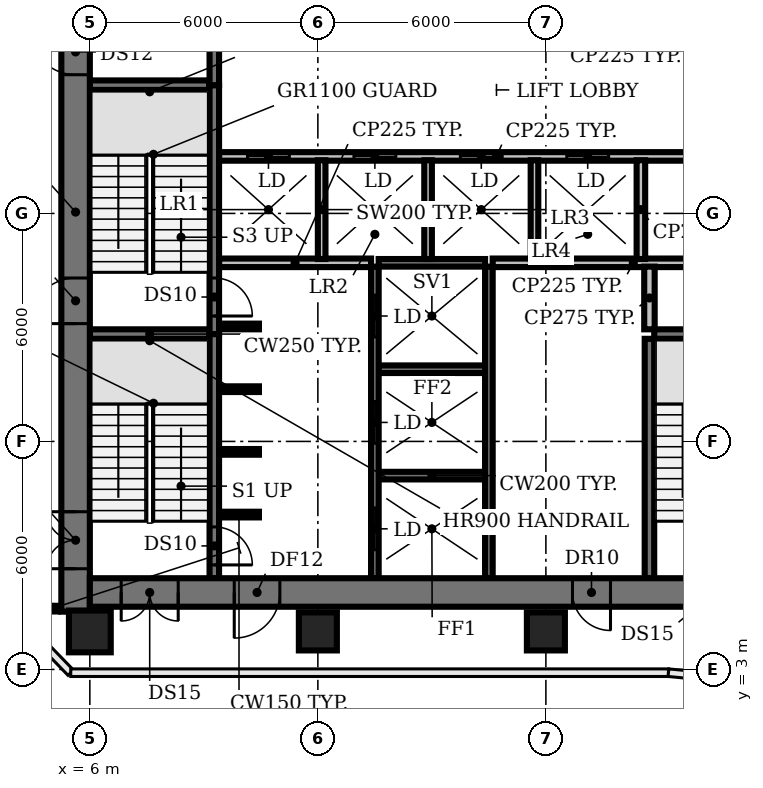
"""IFC4 building model, lengths in metres.
Left out: names, types, materials, properties, quantities, classifications, styles, units other than length and angle.
Written with IfcOpenShell. Run it as: python <this file> out.ifc"""

import sys

from ifc_helpers import new_model, si_unit, direction, frame, frame_2d, origin, origin_2d, place, context, subcontext, project, spatial, rectangle, circle, extrude, element, fill, save


model = new_model("IFC4")
c1 = context("Model", 3, precision=1e-05, world=origin(), true_north=direction((0.0, 1.0)))
c2 = subcontext(c1, "Body", "Model", "MODEL_VIEW")
j1 = project(units=[si_unit("LENGTHUNIT", "METRE"), si_unit("PLANEANGLEUNIT", "RADIAN")], contexts=[c1])
p1 = place(None, origin())
s1 = spatial("IfcSite", under=j1, at=p1, CompositionType="ELEMENT")
p2 = place(p1, origin())
s2 = spatial("IfcBuilding", under=s1, at=p2, CompositionType="ELEMENT")
p3 = place(p2, frame((0.0, 0.0, 134.0)))
s3 = spatial("IfcBuildingStorey", under=s2, at=p3, CompositionType="ELEMENT", Elevation=134.0)
p4 = place(p3, frame((6.0, 4.0, 0.0), z_axis=(0.0, 0.0, 1.0), x_axis=(1.0, 0.0, 0.0)))
e1 = element("IfcColumn", 1, at=p4, inside=s3, PredefinedType="COLUMN", context=c2, shape_type="SweptSolid", body=[
    extrude(circle(Radius=0.55, at=origin_2d()), origin(), (0.0, 0.0, 1.0), 3.2),
])
for number, where, z_axis, x_axis in (
    (2, (12.0, 4.0, 0.0), (0.0, 0.0, 1.0), (1.0, 0.0, 0.0)),
    (3, (18.0, 4.0, 0.0), (0.0, 0.0, 1.0), (1.0, 0.0, 0.0)),
):
    element("IfcColumn", number, at=place(p3, frame(where, z_axis=z_axis, x_axis=x_axis)), inside=s3, PredefinedType="COLUMN", context=c2, shape_type="SweptSolid", body=[
        extrude(rectangle(XDim=1.0, YDim=1.0, at=origin_2d()), origin(), (0.0, 0.0, 1.0), 3.2),
    ])
p5 = place(p3, frame((9.4, 7.075, 0.0), z_axis=(0.0, 0.0, 1.0), x_axis=(1.0, 0.0, 0.0)))
e4 = element("IfcWall", 4, at=p5, inside=s3, PredefinedType="SHEAR", context=c2, shape_type="SweptSolid", body=[
    extrude(rectangle(XDim=1.05, YDim=0.15, at=frame_2d((0.525, 0.0))), origin(), (0.0, 0.0, 1.0), 3.8),
])
p6 = place(p3, frame((13.6, 8.1, 0.0), z_axis=(0.0, 0.0, 1.0), x_axis=(1.0, 0.0, 0.0)))
e5 = element("IfcWall", 5, at=p6, inside=s3, PredefinedType="SHEAR", context=c2, shape_type="SweptSolid", body=[
    extrude(rectangle(XDim=2.8, YDim=0.2, at=frame_2d((1.4, 0.0))), origin(), (0.0, 0.0, 1.0), 3.8),
])
for number, where, z_axis, x_axis in (
    (6, (9.4, 8.725, 0.0), (0.0, 0.0, 1.0), (1.0, 0.0, 0.0)),
    (7, (9.4, 10.375, 0.0), (0.0, 0.0, 1.0), (1.0, 0.0, 0.0)),
):
    element("IfcWall", number, at=place(p3, frame(where, z_axis=z_axis, x_axis=x_axis)), inside=s3, PredefinedType="SHEAR", context=c2, shape_type="SweptSolid", body=[
        extrude(rectangle(XDim=1.05, YDim=0.15, at=frame_2d((0.525, 0.0))), origin(), (0.0, 0.0, 1.0), 3.8),
    ])
p7 = place(p3, frame((13.6, 10.9, 0.0), z_axis=(0.0, 0.0, 1.0), x_axis=(1.0, 0.0, 0.0)))
e8 = element("IfcWall", 8, at=p7, inside=s3, PredefinedType="SHEAR", context=c2, shape_type="SweptSolid", body=[
    extrude(rectangle(XDim=2.8, YDim=0.2, at=frame_2d((1.4, 0.0))), origin(), (0.0, 0.0, 1.0), 3.8),
])
for number, where, z_axis, x_axis in (
    (9, (6.0, 11.825, 0.0), (0.0, 0.0, 1.0), (1.0, 0.0, 0.0)),
    (10, (20.85, 11.825, 0.0), (0.0, 0.0, 1.0), (1.0, 0.0, 0.0)),
):
    element("IfcWall", number, at=place(p3, frame(where, z_axis=z_axis, x_axis=x_axis)), inside=s3, PredefinedType="SHEAR", context=c2, shape_type="SweptSolid", body=[
        extrude(rectangle(XDim=3.15, YDim=0.25, at=frame_2d((1.575, 0.0))), origin(), (0.0, 0.0, 1.0), 3.8),
    ])
p8 = place(p3, frame((9.4, 12.025, 0.0), z_axis=(0.0, 0.0, 1.0), x_axis=(1.0, 0.0, 0.0)))
e11 = element("IfcWall", 11, at=p8, inside=s3, PredefinedType="SHEAR", context=c2, shape_type="SweptSolid", body=[
    extrude(rectangle(XDim=1.05, YDim=0.15, at=frame_2d((0.525, 0.0))), origin(), (0.0, 0.0, 1.0), 3.8),
])
p9 = place(p3, frame((9.4, 13.7, 0.0), z_axis=(0.0, 0.0, 1.0), x_axis=(1.0, 0.0, 0.0)))
e12 = element("IfcWall", 12, at=p9, inside=s3, PredefinedType="PARTITIONING", context=c2, shape_type="SweptSolid", body=[
    extrude(rectangle(XDim=4.0, YDim=0.225, at=frame_2d((2.0, 0.0))), origin(), (0.0, 0.0, 1.0), 3.8),
])
p10 = place(p3, frame((13.6, 13.7, 0.0), z_axis=(0.0, 0.0, 1.0), x_axis=(1.0, 0.0, 0.0)))
e13 = element("IfcWall", 13, at=p10, inside=s3, PredefinedType="SHEAR", context=c2, shape_type="SweptSolid", body=[
    extrude(rectangle(XDim=2.8, YDim=0.2, at=frame_2d((1.4, 0.0))), origin(), (0.0, 0.0, 1.0), 3.8),
])
p11 = place(p3, frame((16.6, 13.7, 0.0), z_axis=(0.0, 0.0, 1.0), x_axis=(1.0, 0.0, 0.0)))
e14 = element("IfcWall", 14, at=p11, inside=s3, PredefinedType="PARTITIONING", context=c2, shape_type="SweptSolid", body=[
    extrude(rectangle(XDim=7.4, YDim=0.225, at=frame_2d((3.7, 0.0))), origin(), (0.0, 0.0, 1.0), 3.8),
])
p12 = place(p3, frame((9.4, 16.5, 0.0), z_axis=(0.0, 0.0, 1.0), x_axis=(1.0, 0.0, 0.0)))
e15 = element("IfcWall", 15, at=p12, inside=s3, PredefinedType="PARTITIONING", context=c2, shape_type="SweptSolid", body=[
    extrude(rectangle(XDim=14.6, YDim=0.225, at=frame_2d((7.3, 0.0))), origin(), (0.0, 0.0, 1.0), 3.8),
])
p13 = place(p12, frame((0.75, 0.0, 0.0)))
e16 = element("IfcOpeningElement", 16, at=p13, cuts=e15, PredefinedType="OPENING", context=c2, shape_type="SweptSolid", body=[
    extrude(rectangle(XDim=1.1, YDim=2.1, at=frame_2d((0.55, 1.05))), frame((0.0, 0.123, 0.0), z_axis=(0.0, -1.0, 0.0), x_axis=(1.0, 0.0, 0.0)), (0.0, 0.0, 1.0), 0.245),
])
p14 = place(p12, frame((3.55, 0.0, 0.0)))
e17 = element("IfcOpeningElement", 17, at=p14, cuts=e15, PredefinedType="OPENING", context=c2, shape_type="SweptSolid", body=[
    extrude(rectangle(XDim=1.1, YDim=2.1, at=frame_2d((0.55, 1.05))), frame((0.0, 0.123, 0.0), z_axis=(0.0, -1.0, 0.0), x_axis=(1.0, 0.0, 0.0)), (0.0, 0.0, 1.0), 0.245),
])
p15 = place(p12, frame((6.35, 0.0, 0.0)))
e18 = element("IfcOpeningElement", 18, at=p15, cuts=e15, PredefinedType="OPENING", context=c2, shape_type="SweptSolid", body=[
    extrude(rectangle(XDim=1.1, YDim=2.1, at=frame_2d((0.55, 1.05))), frame((0.0, 0.123, 0.0), z_axis=(0.0, -1.0, 0.0), x_axis=(1.0, 0.0, 0.0)), (0.0, 0.0, 1.0), 0.245),
])
p16 = place(p12, frame((9.15, 0.0, 0.0)))
e19 = element("IfcOpeningElement", 19, at=p16, cuts=e15, PredefinedType="OPENING", context=c2, shape_type="SweptSolid", body=[
    extrude(rectangle(XDim=1.1, YDim=2.1, at=frame_2d((0.55, 1.05))), frame((0.0, 0.123, 0.0), z_axis=(0.0, -1.0, 0.0), x_axis=(1.0, 0.0, 0.0)), (0.0, 0.0, 1.0), 0.245),
])
p17 = place(p12, frame((12.4, 0.0, 0.0)))
e20 = element("IfcOpeningElement", 20, at=p17, cuts=e15, PredefinedType="OPENING", context=c2, shape_type="SweptSolid", body=[
    extrude(rectangle(XDim=1.0, YDim=2.1, at=frame_2d((0.5, 1.05))), frame((0.0, 0.123, 0.0), z_axis=(0.0, -1.0, 0.0), x_axis=(1.0, 0.0, 0.0)), (0.0, 0.0, 1.0), 0.245),
])
p18 = place(p3, frame((6.0, 18.375, 0.0), z_axis=(0.0, 0.0, 1.0), x_axis=(1.0, 0.0, 0.0)))
e21 = element("IfcWall", 21, at=p18, inside=s3, PredefinedType="SHEAR", context=c2, shape_type="SweptSolid", body=[
    extrude(rectangle(XDim=3.15, YDim=0.25, at=frame_2d((1.575, 0.0))), origin(), (0.0, 0.0, 1.0), 3.8),
])
p19 = place(p3, frame((9.275, 11.825, 0.0), z_axis=(0.0, 0.0, 1.0), x_axis=(0.0, -1.0, 0.0)))
e22 = element("IfcWall", 22, at=p19, inside=s3, PredefinedType="SHEAR", context=c2, shape_type="SweptSolid", body=[
    extrude(rectangle(XDim=6.425, YDim=0.25, at=frame_2d((3.212, 0.0))), origin(), (0.0, 0.0, 1.0), 3.8),
])
p20 = place(p19, frame((5.075, 0.0, 0.0)))
e23 = element("IfcOpeningElement", 23, at=p20, cuts=e22, PredefinedType="OPENING", context=c2, shape_type="SweptSolid", body=[
    extrude(rectangle(XDim=1.0, YDim=2.1, at=frame_2d((0.5, 1.05))), frame((0.0, 0.135, 0.0), z_axis=(0.0, -1.0, 0.0), x_axis=(1.0, 0.0, 0.0)), (0.0, 0.0, 1.0), 0.27),
])
p21 = place(p3, frame((9.275, 18.375, 0.0), z_axis=(0.0, 0.0, 1.0), x_axis=(0.0, -1.0, 0.0)))
e24 = element("IfcWall", 24, at=p21, inside=s3, PredefinedType="SHEAR", context=c2, shape_type="SweptSolid", body=[
    extrude(rectangle(XDim=6.55, YDim=0.25, at=frame_2d((3.275, 0.0))), origin(), (0.0, 0.0, 1.0), 3.8),
])
p22 = place(p21, frame((5.075, 0.0, 0.0)))
e25 = element("IfcOpeningElement", 25, at=p22, cuts=e24, PredefinedType="OPENING", context=c2, shape_type="SweptSolid", body=[
    extrude(rectangle(XDim=1.0, YDim=2.1, at=frame_2d((0.5, 1.05))), frame((0.0, 0.135, 0.0), z_axis=(0.0, -1.0, 0.0), x_axis=(1.0, 0.0, 0.0)), (0.0, 0.0, 1.0), 0.27),
])
p23 = place(p3, frame((9.275, 18.375, 0.0), z_axis=(0.0, 0.0, 1.0), x_axis=(0.0, 1.0, 0.0)))
e26 = element("IfcWall", 26, at=p23, inside=s3, PredefinedType="SHEAR", context=c2, shape_type="SweptSolid", body=[
    extrude(rectangle(XDim=6.425, YDim=0.25, at=frame_2d((3.212, 0.0))), origin(), (0.0, 0.0, 1.0), 3.8),
])
p24 = place(p3, frame((12.1, 13.8, 0.0), z_axis=(0.0, 0.0, 1.0), x_axis=(0.0, 1.0, 0.0)))
e27 = element("IfcWall", 27, at=p24, inside=s3, PredefinedType="SOLIDWALL", context=c2, shape_type="SweptSolid", body=[
    extrude(rectangle(XDim=2.6, YDim=0.2, at=frame_2d((1.3, 0.0))), origin(), (0.0, 0.0, 1.0), 3.8),
])
p25 = place(p3, frame((13.5, 5.4, 0.0), z_axis=(0.0, 0.0, 1.0), x_axis=(0.0, 1.0, 0.0)))
e28 = element("IfcWall", 28, at=p25, inside=s3, PredefinedType="SHEAR", context=c2, shape_type="SweptSolid", body=[
    extrude(rectangle(XDim=8.2, YDim=0.2, at=frame_2d((4.1, 0.0))), origin(), (0.0, 0.0, 1.0), 3.8),
])
p26 = place(p25, frame((0.75, 0.0, 0.0)))
e29 = element("IfcOpeningElement", 29, at=p26, cuts=e28, PredefinedType="OPENING", context=c2, shape_type="SweptSolid", body=[
    extrude(rectangle(XDim=1.1, YDim=2.1, at=frame_2d((0.55, 1.05))), frame((0.0, 0.11, 0.0), z_axis=(0.0, -1.0, 0.0), x_axis=(1.0, 0.0, 0.0)), (0.0, 0.0, 1.0), 0.22),
])
p27 = place(p25, frame((3.55, 0.0, 0.0)))
e30 = element("IfcOpeningElement", 30, at=p27, cuts=e28, PredefinedType="OPENING", context=c2, shape_type="SweptSolid", body=[
    extrude(rectangle(XDim=1.1, YDim=2.1, at=frame_2d((0.55, 1.05))), frame((0.0, 0.11, 0.0), z_axis=(0.0, -1.0, 0.0), x_axis=(1.0, 0.0, 0.0)), (0.0, 0.0, 1.0), 0.22),
])
p28 = place(p25, frame((6.35, 0.0, 0.0)))
e31 = element("IfcOpeningElement", 31, at=p28, cuts=e28, PredefinedType="OPENING", context=c2, shape_type="SweptSolid", body=[
    extrude(rectangle(XDim=1.1, YDim=2.1, at=frame_2d((0.55, 1.05))), frame((0.0, 0.11, 0.0), z_axis=(0.0, -1.0, 0.0), x_axis=(1.0, 0.0, 0.0)), (0.0, 0.0, 1.0), 0.22),
])
p29 = place(p3, frame((14.9, 13.8, 0.0), z_axis=(0.0, 0.0, 1.0), x_axis=(0.0, 1.0, 0.0)))
e32 = element("IfcWall", 32, at=p29, inside=s3, PredefinedType="SOLIDWALL", context=c2, shape_type="SweptSolid", body=[
    extrude(rectangle(XDim=2.6, YDim=0.2, at=frame_2d((1.3, 0.0))), origin(), (0.0, 0.0, 1.0), 3.8),
])
p30 = place(p3, frame((16.5, 5.4, 0.0), z_axis=(0.0, 0.0, 1.0), x_axis=(0.0, 1.0, 0.0)))
e33 = element("IfcWall", 33, at=p30, inside=s3, PredefinedType="SHEAR", context=c2, shape_type="SweptSolid", body=[
    extrude(rectangle(XDim=8.2, YDim=0.2, at=frame_2d((4.1, 0.0))), origin(), (0.0, 0.0, 1.0), 3.8),
])
p31 = place(p3, frame((17.7, 13.8, 0.0), z_axis=(0.0, 0.0, 1.0), x_axis=(0.0, 1.0, 0.0)))
e34 = element("IfcWall", 34, at=p31, inside=s3, PredefinedType="SOLIDWALL", context=c2, shape_type="SweptSolid", body=[
    extrude(rectangle(XDim=2.6, YDim=0.2, at=frame_2d((1.3, 0.0))), origin(), (0.0, 0.0, 1.0), 3.8),
])
p32 = place(p3, frame((20.5, 13.8, 0.0), z_axis=(0.0, 0.0, 1.0), x_axis=(0.0, 1.0, 0.0)))
e35 = element("IfcWall", 35, at=p32, inside=s3, PredefinedType="PARTITIONING", context=c2, shape_type="SweptSolid", body=[
    extrude(rectangle(XDim=2.6, YDim=0.225, at=frame_2d((1.3, 0.0))), origin(), (0.0, 0.0, 1.0), 3.8),
])
p33 = place(p3, frame((20.725, 5.4, 0.0), z_axis=(0.0, 0.0, 1.0), x_axis=(0.0, 1.0, 0.0)))
e36 = element("IfcWall", 36, at=p33, inside=s3, PredefinedType="SHEAR", context=c2, shape_type="SweptSolid", body=[
    extrude(rectangle(XDim=6.3, YDim=0.25, at=frame_2d((3.15, 0.0))), origin(), (0.0, 0.0, 1.0), 3.8),
])
p34 = place(p3, frame((20.725, 11.95, 0.0), z_axis=(0.0, 0.0, 1.0), x_axis=(0.0, 1.0, 0.0)))
e37 = element("IfcWall", 37, at=p34, inside=s3, PredefinedType="PARTITIONING", context=c2, shape_type="SweptSolid", body=[
    extrude(rectangle(XDim=1.65, YDim=0.275, at=frame_2d((0.825, 0.0))), origin(), (0.0, 0.0, 1.0), 3.8),
])
p35 = place(p3, frame((5.625, 4.52, 0.0), z_axis=(0.0, 0.0, 1.0), x_axis=(0.0, 1.0, 0.0)))
e38 = element("IfcWall", 38, at=p35, inside=s3, PredefinedType="SHEAR", context=c2, shape_type="SweptSolid", body=[
    extrude(rectangle(XDim=21.03, YDim=0.75, at=frame_2d((10.515, 0.0))), origin(), (0.0, 0.0, 1.0), 3.8),
])
p36 = place(p35, frame((1.13, 0.0, 0.0)))
e39 = element("IfcOpeningElement", 39, at=p36, cuts=e38, PredefinedType="OPENING", context=c2, shape_type="SweptSolid", body=[
    extrude(rectangle(XDim=1.5, YDim=2.1, at=frame_2d((0.75, 1.05))), frame((0.0, 0.385, 0.0), z_axis=(0.0, -1.0, 0.0), x_axis=(1.0, 0.0, 0.0)), (0.0, 0.0, 1.0), 0.77),
])
p37 = place(p35, frame((7.58, 0.0, 0.0)))
e40 = element("IfcOpeningElement", 40, at=p37, cuts=e38, PredefinedType="OPENING", context=c2, shape_type="SweptSolid", body=[
    extrude(rectangle(XDim=1.2, YDim=2.1, at=frame_2d((0.6, 1.05))), frame((0.0, 0.385, 0.0), z_axis=(0.0, -1.0, 0.0), x_axis=(1.0, 0.0, 0.0)), (0.0, 0.0, 1.0), 0.77),
])
p38 = place(p35, frame((14.13, 0.0, 0.0)))
e41 = element("IfcOpeningElement", 41, at=p38, cuts=e38, PredefinedType="OPENING", context=c2, shape_type="SweptSolid", body=[
    extrude(rectangle(XDim=1.2, YDim=2.1, at=frame_2d((0.6, 1.05))), frame((0.0, 0.385, 0.0), z_axis=(0.0, -1.0, 0.0), x_axis=(1.0, 0.0, 0.0)), (0.0, 0.0, 1.0), 0.77),
])
p39 = place(p3, frame((24.0, 5.025, 0.0), z_axis=(0.0, 0.0, 1.0), x_axis=(-1.0, 0.0, 0.0)))
e42 = element("IfcWall", 42, at=p39, inside=s3, PredefinedType="SHEAR", context=c2, shape_type="SweptSolid", body=[
    extrude(rectangle(XDim=18.0, YDim=0.75, at=frame_2d((9.0, 0.0))), origin(), (0.0, 0.0, 1.0), 3.8),
])
p40 = place(p39, frame((0.825, 0.0, 0.0)))
e43 = element("IfcOpeningElement", 43, at=p40, cuts=e42, PredefinedType="OPENING", context=c2, shape_type="SweptSolid", body=[
    extrude(rectangle(XDim=1.5, YDim=2.1, at=frame_2d((0.75, 1.05))), frame((0.0, 0.385, 0.0), z_axis=(0.0, -1.0, 0.0), x_axis=(1.0, 0.0, 0.0)), (0.0, 0.0, 1.0), 0.77),
])
p41 = place(p39, frame((15.675, 0.0, 0.0)))
e44 = element("IfcOpeningElement", 44, at=p41, cuts=e42, PredefinedType="OPENING", context=c2, shape_type="SweptSolid", body=[
    extrude(rectangle(XDim=1.5, YDim=2.1, at=frame_2d((0.75, 1.05))), frame((0.0, 0.385, 0.0), z_axis=(0.0, -1.0, 0.0), x_axis=(1.0, 0.0, 0.0)), (0.0, 0.0, 1.0), 0.77),
])
p42 = place(p39, frame((13.0, 0.0, 0.0)))
e45 = element("IfcOpeningElement", 45, at=p42, cuts=e42, PredefinedType="OPENING", context=c2, shape_type="SweptSolid", body=[
    extrude(rectangle(XDim=1.2, YDim=2.1, at=frame_2d((0.6, 1.05))), frame((0.0, 0.385, 0.0), z_axis=(0.0, -1.0, 0.0), x_axis=(1.0, 0.0, 0.0)), (0.0, 0.0, 1.0), 0.77),
])
p43 = place(p39, frame((4.3, 0.0, 0.0)))
e46 = element("IfcOpeningElement", 46, at=p43, cuts=e42, PredefinedType="OPENING", context=c2, shape_type="SweptSolid", body=[
    extrude(rectangle(XDim=1.0, YDim=2.1, at=frame_2d((0.5, 1.05))), frame((0.0, 0.385, 0.0), z_axis=(0.0, -1.0, 0.0), x_axis=(1.0, 0.0, 0.0)), (0.0, 0.0, 1.0), 0.77),
])
p44 = place(p3, frame((3.94, 4.6, 0.0), z_axis=(0.0, 0.0, 1.0), x_axis=(1.0, 0.0, 0.0)))
e47 = element("IfcWall", 47, at=p44, inside=s3, PredefinedType="PARTITIONING", context=c2, shape_type="SweptSolid", body=[
    extrude(rectangle(XDim=1.21, YDim=0.15, at=frame_2d((0.605, 0.0))), origin(), (0.0, 0.0, 1.0), 2.78),
])
p45 = place(p13, origin())
e48 = element("IfcDoor", 48, at=p45, inside=s3, OperationType="DOUBLE_DOOR_SLIDING", PredefinedType="DOOR", context=c2, shape_type="SweptSolid", body=[
    extrude(rectangle(XDim=1.1, YDim=2.1, at=frame_2d((0.55, 1.05))), frame((0.0, 0.025, 0.0), z_axis=(0.0, -1.0, 0.0), x_axis=(1.0, 0.0, 0.0)), (0.0, 0.0, 1.0), 0.05),
])
fill(e16, e48)
p46 = place(p14, origin())
e49 = element("IfcDoor", 49, at=p46, inside=s3, OperationType="DOUBLE_DOOR_SLIDING", PredefinedType="DOOR", context=c2, shape_type="SweptSolid", body=[
    extrude(rectangle(XDim=1.1, YDim=2.1, at=frame_2d((0.55, 1.05))), frame((0.0, 0.025, 0.0), z_axis=(0.0, -1.0, 0.0), x_axis=(1.0, 0.0, 0.0)), (0.0, 0.0, 1.0), 0.05),
])
fill(e17, e49)
p47 = place(p15, origin())
e50 = element("IfcDoor", 50, at=p47, inside=s3, OperationType="DOUBLE_DOOR_SLIDING", PredefinedType="DOOR", context=c2, shape_type="SweptSolid", body=[
    extrude(rectangle(XDim=1.1, YDim=2.1, at=frame_2d((0.55, 1.05))), frame((0.0, 0.025, 0.0), z_axis=(0.0, -1.0, 0.0), x_axis=(1.0, 0.0, 0.0)), (0.0, 0.0, 1.0), 0.05),
])
fill(e18, e50)
p48 = place(p16, origin())
e51 = element("IfcDoor", 51, at=p48, inside=s3, OperationType="DOUBLE_DOOR_SLIDING", PredefinedType="DOOR", context=c2, shape_type="SweptSolid", body=[
    extrude(rectangle(XDim=1.1, YDim=2.1, at=frame_2d((0.55, 1.05))), frame((0.0, 0.025, 0.0), z_axis=(0.0, -1.0, 0.0), x_axis=(1.0, 0.0, 0.0)), (0.0, 0.0, 1.0), 0.05),
])
fill(e19, e51)
p49 = place(p20, origin())
e52 = element("IfcDoor", 52, at=p49, inside=s3, OperationType="SINGLE_SWING_RIGHT", PredefinedType="DOOR", context=c2, shape_type="SweptSolid", body=[
    extrude(rectangle(XDim=1.0, YDim=2.1, at=frame_2d((0.5, 1.05))), frame((0.0, 0.025, 0.0), z_axis=(0.0, -1.0, 0.0), x_axis=(1.0, 0.0, 0.0)), (0.0, 0.0, 1.0), 0.05),
])
fill(e23, e52)
p50 = place(p22, origin())
e53 = element("IfcDoor", 53, at=p50, inside=s3, OperationType="SINGLE_SWING_RIGHT", PredefinedType="DOOR", context=c2, shape_type="SweptSolid", body=[
    extrude(rectangle(XDim=1.0, YDim=2.1, at=frame_2d((0.5, 1.05))), frame((0.0, 0.025, 0.0), z_axis=(0.0, -1.0, 0.0), x_axis=(1.0, 0.0, 0.0)), (0.0, 0.0, 1.0), 0.05),
])
fill(e25, e53)
p51 = place(p26, origin())
e54 = element("IfcDoor", 54, at=p51, inside=s3, OperationType="DOUBLE_DOOR_SLIDING", PredefinedType="DOOR", context=c2, shape_type="SweptSolid", body=[
    extrude(rectangle(XDim=1.1, YDim=2.1, at=frame_2d((0.55, 1.05))), frame((0.0, 0.025, 0.0), z_axis=(0.0, -1.0, 0.0), x_axis=(1.0, 0.0, 0.0)), (0.0, 0.0, 1.0), 0.05),
])
fill(e29, e54)
p52 = place(p27, origin())
e55 = element("IfcDoor", 55, at=p52, inside=s3, OperationType="DOUBLE_DOOR_SLIDING", PredefinedType="DOOR", context=c2, shape_type="SweptSolid", body=[
    extrude(rectangle(XDim=1.1, YDim=2.1, at=frame_2d((0.55, 1.05))), frame((0.0, 0.025, 0.0), z_axis=(0.0, -1.0, 0.0), x_axis=(1.0, 0.0, 0.0)), (0.0, 0.0, 1.0), 0.05),
])
fill(e30, e55)
p53 = place(p28, origin())
e56 = element("IfcDoor", 56, at=p53, inside=s3, OperationType="DOUBLE_DOOR_SLIDING", PredefinedType="DOOR", context=c2, shape_type="SweptSolid", body=[
    extrude(rectangle(XDim=1.1, YDim=2.1, at=frame_2d((0.55, 1.05))), frame((0.0, 0.025, 0.0), z_axis=(0.0, -1.0, 0.0), x_axis=(1.0, 0.0, 0.0)), (0.0, 0.0, 1.0), 0.05),
])
fill(e31, e56)
p54 = place(p36, origin())
e57 = element("IfcDoor", 57, at=p54, inside=s3, OperationType="DOUBLE_DOOR_SINGLE_SWING", PredefinedType="DOOR", context=c2, shape_type="SweptSolid", body=[
    extrude(rectangle(XDim=1.5, YDim=2.1, at=frame_2d((0.75, 1.05))), frame((0.0, 0.025, 0.0), z_axis=(0.0, -1.0, 0.0), x_axis=(1.0, 0.0, 0.0)), (0.0, 0.0, 1.0), 0.05),
])
fill(e39, e57)
p55 = place(p37, origin())
e58 = element("IfcDoor", 58, at=p55, inside=s3, OperationType="SINGLE_SWING_LEFT", PredefinedType="DOOR", context=c2, shape_type="SweptSolid", body=[
    extrude(rectangle(XDim=1.2, YDim=2.1, at=frame_2d((0.6, 1.05))), frame((0.0, 0.025, 0.0), z_axis=(0.0, -1.0, 0.0), x_axis=(1.0, 0.0, 0.0)), (0.0, 0.0, 1.0), 0.05),
])
fill(e40, e58)
p56 = place(p38, origin())
e59 = element("IfcDoor", 59, at=p56, inside=s3, OperationType="SINGLE_SWING_RIGHT", PredefinedType="DOOR", context=c2, shape_type="SweptSolid", body=[
    extrude(rectangle(XDim=1.2, YDim=2.1, at=frame_2d((0.6, 1.05))), frame((0.0, 0.025, 0.0), z_axis=(0.0, -1.0, 0.0), x_axis=(1.0, 0.0, 0.0)), (0.0, 0.0, 1.0), 0.05),
])
fill(e41, e59)
p57 = place(p41, origin())
e60 = element("IfcDoor", 60, at=p57, inside=s3, OperationType="DOUBLE_DOOR_SINGLE_SWING", PredefinedType="DOOR", context=c2, shape_type="SweptSolid", body=[
    extrude(rectangle(XDim=1.5, YDim=2.1, at=frame_2d((0.75, 1.05))), frame((0.0, 0.025, 0.0), z_axis=(0.0, -1.0, 0.0), x_axis=(1.0, 0.0, 0.0)), (0.0, 0.0, 1.0), 0.05),
])
fill(e44, e60)
p58 = place(p42, origin())
e61 = element("IfcDoor", 61, at=p58, inside=s3, OperationType="SINGLE_SWING_RIGHT", PredefinedType="DOOR", context=c2, shape_type="SweptSolid", body=[
    extrude(rectangle(XDim=1.2, YDim=2.1, at=frame_2d((0.6, 1.05))), frame((0.0, 0.025, 0.0), z_axis=(0.0, -1.0, 0.0), x_axis=(1.0, 0.0, 0.0)), (0.0, 0.0, 1.0), 0.05),
])
fill(e45, e61)
p59 = place(p43, origin())
e62 = element("IfcDoor", 62, at=p59, inside=s3, OperationType="SINGLE_SWING_LEFT", PredefinedType="DOOR", context=c2, shape_type="SweptSolid", body=[
    extrude(rectangle(XDim=1.0, YDim=2.1, at=frame_2d((0.5, 1.05))), frame((0.0, -0.315, 0.0), z_axis=(0.0, -1.0, 0.0), x_axis=(1.0, 0.0, 0.0)), (0.0, 0.0, 1.0), 0.05),
])
fill(e46, e62)
save(model, sys.argv[1])
